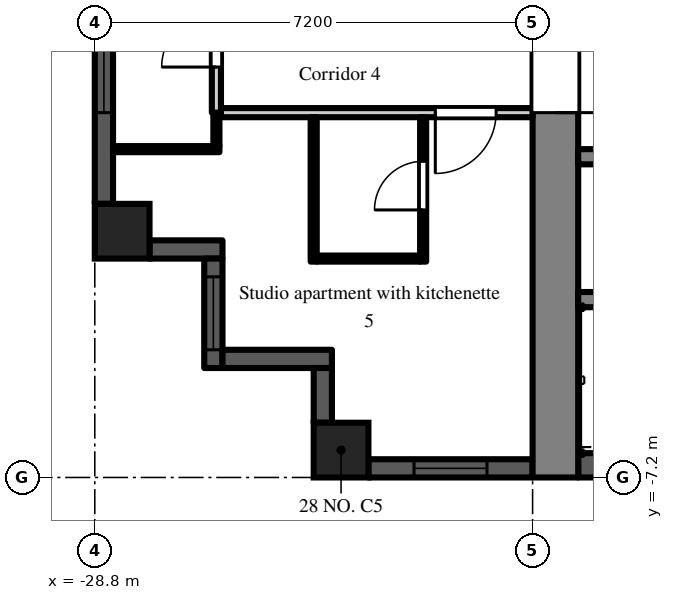
"""IFC4 building model, lengths in metres.
Left out: names, types, materials, properties, quantities, classifications, styles, units other than length and angle.
Written with IfcOpenShell. Run it as: python <this file> out.ifc"""

import sys

from ifc_helpers import new_model, si_unit, direction, frame, frame_2d, origin, origin_2d, place, context, subcontext, project, spatial, rectangle, extrude, element, fill, save


model = new_model("IFC4")
c1 = context("Model", 3, precision=1e-05, world=origin(), true_north=direction((0.0, 1.0)))
c2 = subcontext(c1, "Body", "Model", "MODEL_VIEW")
j1 = project(units=[si_unit("LENGTHUNIT", "METRE"), si_unit("PLANEANGLEUNIT", "RADIAN")], contexts=[c1])
p1 = place(None, origin())
s1 = spatial("IfcSite", under=j1, at=p1, CompositionType="ELEMENT")
p2 = place(p1, origin())
s2 = spatial("IfcBuilding", under=s1, at=p2, CompositionType="ELEMENT")
p3 = place(p2, frame((0.0, 0.0, 231.9)))
s3 = spatial("IfcBuildingStorey", under=s2, at=p3, CompositionType="ELEMENT", Elevation=231.9)
for number, where, z_axis, x_axis in (
    (1, (-28.35, -3.15, 0.0), (0.0, 0.0, 1.0), (1.0, 0.0, 0.0)),
    (2, (-24.75, -6.75, 0.0), (0.0, 0.0, 1.0), (1.0, 0.0, 0.0)),
):
    element("IfcColumn", number, at=place(p3, frame(where, z_axis=z_axis, x_axis=x_axis)), inside=s3, PredefinedType="COLUMN", context=c2, shape_type="SweptSolid", body=[
        extrude(rectangle(XDim=0.9, YDim=0.9, at=origin_2d()), origin(), (0.0, 0.0, 1.0), 3.0),
    ])
p4 = place(p3, frame((-28.65, 2.7, 0.0), z_axis=(0.0, 0.0, 1.0), x_axis=(0.0, -1.0, 0.0)))
e3 = element("IfcWall", 3, at=p4, inside=s3, PredefinedType="SOLIDWALL", context=c2, shape_type="SweptSolid", body=[
    extrude(rectangle(XDim=5.4, YDim=0.3, at=frame_2d((2.7, 0.0))), origin(), (0.0, 0.0, 1.0), 2.3),
])
p5 = place(p4, frame((1.5, 0.0, 0.2)))
e4 = element("IfcOpeningElement", 4, at=p5, cuts=e3, PredefinedType="OPENING", context=c2, shape_type="SweptSolid", body=[
    extrude(rectangle(XDim=2.4, YDim=1.85, at=frame_2d((1.2, 0.925))), frame((0.0, 0.16, 0.0), z_axis=(0.0, -1.0, 0.0), x_axis=(1.0, 0.0, 0.0)), (0.0, 0.0, 1.0), 0.32),
])
p6 = place(p3, frame((-27.9, -3.45, 0.0), z_axis=(0.0, 0.0, 1.0), x_axis=(1.0, 0.0, 0.0)))
e5 = element("IfcWall", 5, at=p6, inside=s3, PredefinedType="SOLIDWALL", context=c2, shape_type="SweptSolid", body=[
    extrude(rectangle(XDim=1.2, YDim=0.3, at=frame_2d((0.6, 0.0))), origin(), (0.0, 0.0, 1.0), 2.6),
])
p7 = place(p3, frame((-26.85, -3.6, 0.0), z_axis=(0.0, 0.0, 1.0), x_axis=(0.0, -1.0, 0.0)))
e6 = element("IfcWall", 6, at=p7, inside=s3, PredefinedType="SOLIDWALL", context=c2, shape_type="SweptSolid", body=[
    extrude(rectangle(XDim=1.8, YDim=0.3, at=frame_2d((0.9, 0.0))), origin(), (0.0, 0.0, 1.0), 2.6),
])
p8 = place(p7, frame((0.3, 0.0, 0.2)))
e7 = element("IfcOpeningElement", 7, at=p8, cuts=e6, PredefinedType="OPENING", context=c2, shape_type="SweptSolid", body=[
    extrude(rectangle(XDim=1.2, YDim=1.85, at=frame_2d((0.6, 0.925))), frame((0.0, 0.16, 0.0), z_axis=(0.0, -1.0, 0.0), x_axis=(1.0, 0.0, 0.0)), (0.0, 0.0, 1.0), 0.32),
])
p9 = place(p3, frame((-26.7, -5.25, 0.0), z_axis=(0.0, 0.0, 1.0), x_axis=(1.0, 0.0, 0.0)))
e8 = element("IfcWall", 8, at=p9, inside=s3, PredefinedType="SOLIDWALL", context=c2, shape_type="SweptSolid", body=[
    extrude(rectangle(XDim=1.8, YDim=0.3, at=frame_2d((0.9, 0.0))), origin(), (0.0, 0.0, 1.0), 2.6),
])
p10 = place(p3, frame((-25.05, -5.4, 0.0), z_axis=(0.0, 0.0, 1.0), x_axis=(0.0, -1.0, 0.0)))
e9 = element("IfcWall", 9, at=p10, inside=s3, PredefinedType="SOLIDWALL", context=c2, shape_type="SweptSolid", body=[
    extrude(rectangle(XDim=0.9, YDim=0.3, at=frame_2d((0.45, 0.0))), origin(), (0.0, 0.0, 1.0), 2.6),
])
p11 = place(p3, frame((-24.3, -7.05, 0.0), z_axis=(0.0, 0.0, 1.0), x_axis=(1.0, 0.0, 0.0)))
e10 = element("IfcWall", 10, at=p11, inside=s3, PredefinedType="SOLIDWALL", context=c2, shape_type="SweptSolid", body=[
    extrude(rectangle(XDim=2.7, YDim=0.3, at=frame_2d((1.35, 0.0))), origin(), (0.0, 0.0, 1.0), 2.3),
])
p12 = place(p11, frame((0.75, 0.0, 0.2)))
e11 = element("IfcOpeningElement", 11, at=p12, cuts=e10, PredefinedType="OPENING", context=c2, shape_type="SweptSolid", body=[
    extrude(rectangle(XDim=1.2, YDim=1.85, at=frame_2d((0.6, 0.925))), frame((0.0, 0.16, 0.0), z_axis=(0.0, -1.0, 0.0), x_axis=(1.0, 0.0, 0.0)), (0.0, 0.0, 1.0), 0.32),
])
p13 = place(p3, frame((-21.225, -7.2, 0.0), z_axis=(0.0, 0.0, 1.0), x_axis=(0.0, 1.0, 0.0)))
e12 = element("IfcWall", 12, at=p13, inside=s3, PredefinedType="SHEAR", context=c2, shape_type="SweptSolid", body=[
    extrude(rectangle(XDim=14.4, YDim=0.75, at=frame_2d((7.2, 0.0))), origin(), (0.0, 0.0, 1.0), 2.6),
])
p14 = place(p13, frame((6.0, 0.0, 0.0)))
e13 = element("IfcOpeningElement", 13, at=p14, cuts=e12, PredefinedType="OPENING", context=c2, shape_type="SweptSolid", body=[
    extrude(rectangle(XDim=2.4, YDim=2.2, at=frame_2d((1.2, 1.1))), frame((0.0, 0.385, 0.0), z_axis=(0.0, -1.0, 0.0), x_axis=(1.0, 0.0, 0.0)), (0.0, 0.0, 1.0), 0.77),
])
p15 = place(p3, frame((-7.9, -7.0, 0.0), z_axis=(0.0, 0.0, 1.0), x_axis=(-1.0, 0.0, 0.0)))
e14 = element("IfcWall", 14, at=p15, inside=s3, PredefinedType="SHEAR", context=c2, shape_type="SweptSolid", body=[
    extrude(rectangle(XDim=12.95, YDim=0.4, at=frame_2d((6.475, 0.0))), origin(), (0.0, 0.0, 1.0), 2.6),
])
p16 = place(p3, frame((-7.9, -1.925, 0.0), z_axis=(0.0, 0.0, 1.0), x_axis=(-1.0, 0.0, 0.0)))
e15 = element("IfcWall", 15, at=p16, inside=s3, PredefinedType="SHEAR", context=c2, shape_type="SweptSolid", body=[
    extrude(rectangle(XDim=12.95, YDim=0.25, at=frame_2d((6.475, 0.0))), origin(), (0.0, 0.0, 1.0), 2.6),
])
p17 = place(p16, frame((0.525, 0.0, 0.0)))
e16 = element("IfcOpeningElement", 16, at=p17, cuts=e15, PredefinedType="OPENING", context=c2, shape_type="SweptSolid", body=[
    extrude(rectangle(XDim=0.9, YDim=2.1, at=frame_2d((0.45, 1.05))), frame((0.0, 0.135, 0.0), z_axis=(0.0, -1.0, 0.0), x_axis=(1.0, 0.0, 0.0)), (0.0, 0.0, 1.0), 0.27),
])
p18 = place(p16, frame((2.625, 0.0, 0.0)))
e17 = element("IfcOpeningElement", 17, at=p18, cuts=e15, PredefinedType="OPENING", context=c2, shape_type="SweptSolid", body=[
    extrude(rectangle(XDim=1.1, YDim=2.1, at=frame_2d((0.55, 1.05))), frame((0.0, 0.135, 0.0), z_axis=(0.0, -1.0, 0.0), x_axis=(1.0, 0.0, 0.0)), (0.0, 0.0, 1.0), 0.27),
])
p19 = place(p16, frame((4.925, 0.0, 0.0)))
e18 = element("IfcOpeningElement", 18, at=p19, cuts=e15, PredefinedType="OPENING", context=c2, shape_type="SweptSolid", body=[
    extrude(rectangle(XDim=0.9, YDim=2.1, at=frame_2d((0.45, 1.05))), frame((0.0, 0.135, 0.0), z_axis=(0.0, -1.0, 0.0), x_axis=(1.0, 0.0, 0.0)), (0.0, 0.0, 1.0), 0.27),
])
p20 = place(p16, frame((8.225, 0.0, 0.0)))
e19 = element("IfcOpeningElement", 19, at=p20, cuts=e15, PredefinedType="OPENING", context=c2, shape_type="SweptSolid", body=[
    extrude(rectangle(XDim=0.9, YDim=2.1, at=frame_2d((0.45, 1.05))), frame((0.0, 0.135, 0.0), z_axis=(0.0, -1.0, 0.0), x_axis=(1.0, 0.0, 0.0)), (0.0, 0.0, 1.0), 0.27),
])
p21 = place(p16, frame((11.525, 0.0, 0.0)))
e20 = element("IfcOpeningElement", 20, at=p21, cuts=e15, PredefinedType="OPENING", context=c2, shape_type="SweptSolid", body=[
    extrude(rectangle(XDim=0.9, YDim=2.1, at=frame_2d((0.45, 1.05))), frame((0.0, 0.135, 0.0), z_axis=(0.0, -1.0, 0.0), x_axis=(1.0, 0.0, 0.0)), (0.0, 0.0, 1.0), 0.27),
])
p22 = place(p3, frame((-12.3, -4.275, 0.0), z_axis=(0.0, 0.0, 1.0), x_axis=(-1.0, 0.0, 0.0)))
e21 = element("IfcWall", 21, at=p22, inside=s3, PredefinedType="SHEAR", context=c2, shape_type="SweptSolid", body=[
    extrude(rectangle(XDim=8.55, YDim=0.25, at=frame_2d((4.275, 0.0))), origin(), (0.0, 0.0, 1.0), 2.6),
])
p23 = place(p3, frame((-28.5, -1.8, 0.0), z_axis=(0.0, 0.0, 1.0), x_axis=(1.0, 0.0, 0.0)))
e22 = element("IfcWall", 22, at=p23, inside=s3, PredefinedType="PARTITIONING", context=c2, shape_type="SweptSolid", body=[
    extrude(rectangle(XDim=1.75, YDim=0.1, at=frame_2d((0.875, 0.0))), origin(), (0.0, 0.0, 1.0), 2.6),
])
p24 = place(p3, frame((-26.8, -1.75, 0.0), z_axis=(0.0, 0.0, 1.0), x_axis=(0.0, 1.0, 0.0)))
e23 = element("IfcWall", 23, at=p24, inside=s3, PredefinedType="PARTITIONING", context=c2, shape_type="SweptSolid", body=[
    extrude(rectangle(XDim=0.55, YDim=0.1, at=frame_2d((0.275, 0.0))), origin(), (0.0, 0.0, 1.0), 2.6),
])
p25 = place(p3, frame((-26.8, -1.2, 0.0), z_axis=(0.0, 0.0, 1.0), x_axis=(0.0, 1.0, 0.0)))
e24 = element("IfcWall", 24, at=p25, inside=s3, PredefinedType="PARTITIONING", context=c2, shape_type="SweptSolid", body=[
    extrude(rectangle(XDim=2.4, YDim=0.15, at=frame_2d((1.2, 0.0))), origin(), (0.0, 0.0, 1.0), 2.6),
])
p26 = place(p25, frame((0.75, 0.0, 0.0)))
e25 = element("IfcOpeningElement", 25, at=p26, cuts=e24, PredefinedType="OPENING", context=c2, shape_type="SweptSolid", body=[
    extrude(rectangle(XDim=0.9, YDim=2.1, at=frame_2d((0.45, 1.05))), frame((0.0, 0.085, 0.0), z_axis=(0.0, -1.0, 0.0), x_axis=(1.0, 0.0, 0.0)), (0.0, 0.0, 1.0), 0.17),
])
p27 = place(p3, frame((-26.725, -1.2, 0.0), z_axis=(0.0, 0.0, 1.0), x_axis=(1.0, 0.0, 0.0)))
e26 = element("IfcWall", 26, at=p27, inside=s3, PredefinedType="PARTITIONING", context=c2, shape_type="SweptSolid", body=[
    extrude(rectangle(XDim=5.125, YDim=0.15, at=frame_2d((2.562, 0.0))), origin(), (0.0, 0.0, 1.0), 2.6),
])
p28 = place(p27, frame((3.525, 0.0, 0.0)))
e27 = element("IfcOpeningElement", 27, at=p28, cuts=e26, PredefinedType="OPENING", context=c2, shape_type="SweptSolid", body=[
    extrude(rectangle(XDim=1.0, YDim=2.1, at=frame_2d((0.5, 1.05))), frame((0.0, 0.085, 0.0), z_axis=(0.0, -1.0, 0.0), x_axis=(1.0, 0.0, 0.0)), (0.0, 0.0, 1.0), 0.17),
])
p29 = place(p3, frame((-25.2, -3.65, 0.0), z_axis=(0.0, 0.0, 1.0), x_axis=(0.0, 1.0, 0.0)))
e28 = element("IfcWall", 28, at=p29, inside=s3, PredefinedType="PARTITIONING", context=c2, shape_type="SweptSolid", body=[
    extrude(rectangle(XDim=2.375, YDim=0.1, at=frame_2d((1.188, 0.0))), origin(), (0.0, 0.0, 1.0), 2.6),
])
p30 = place(p3, frame((-25.15, -3.6, 0.0), z_axis=(0.0, 0.0, 1.0), x_axis=(1.0, 0.0, 0.0)))
e29 = element("IfcWall", 29, at=p30, inside=s3, PredefinedType="PARTITIONING", context=c2, shape_type="SweptSolid", body=[
    extrude(rectangle(XDim=1.7, YDim=0.1, at=frame_2d((0.85, 0.0))), origin(), (0.0, 0.0, 1.0), 2.6),
])
p31 = place(p3, frame((-23.4, -3.65, 0.0), z_axis=(0.0, 0.0, 1.0), x_axis=(0.0, 1.0, 0.0)))
e30 = element("IfcWall", 30, at=p31, inside=s3, PredefinedType="PARTITIONING", context=c2, shape_type="SweptSolid", body=[
    extrude(rectangle(XDim=2.375, YDim=0.1, at=frame_2d((1.188, 0.0))), origin(), (0.0, 0.0, 1.0), 2.6),
])
p32 = place(p31, frame((0.85, 0.0, 0.0)))
e31 = element("IfcOpeningElement", 31, at=p32, cuts=e30, PredefinedType="OPENING", context=c2, shape_type="SweptSolid", body=[
    extrude(rectangle(XDim=0.8, YDim=2.1, at=frame_2d((0.4, 1.05))), frame((0.0, 0.06, 0.0), z_axis=(0.0, -1.0, 0.0), x_axis=(1.0, 0.0, 0.0)), (0.0, 0.0, 1.0), 0.12),
])
p33 = place(p5, origin())
e32 = element("IfcWindow", 32, at=p33, inside=s3, PartitioningType="SINGLE_PANEL", PredefinedType="WINDOW", context=c2, shape_type="SweptSolid", body=[
    extrude(rectangle(XDim=2.4, YDim=1.85, at=frame_2d((1.2, 0.925))), frame((0.0, 0.03, 0.0), z_axis=(0.0, -1.0, 0.0), x_axis=(1.0, 0.0, 0.0)), (0.0, 0.0, 1.0), 0.06),
])
fill(e4, e32)
p34 = place(p8, origin())
e33 = element("IfcWindow", 33, at=p34, inside=s3, PartitioningType="SINGLE_PANEL", PredefinedType="WINDOW", context=c2, shape_type="SweptSolid", body=[
    extrude(rectangle(XDim=1.2, YDim=1.85, at=frame_2d((0.6, 0.925))), frame((0.0, 0.03, 0.0), z_axis=(0.0, -1.0, 0.0), x_axis=(1.0, 0.0, 0.0)), (0.0, 0.0, 1.0), 0.06),
])
fill(e7, e33)
p35 = place(p12, origin())
e34 = element("IfcWindow", 34, at=p35, inside=s3, PartitioningType="SINGLE_PANEL", PredefinedType="WINDOW", context=c2, shape_type="SweptSolid", body=[
    extrude(rectangle(XDim=1.2, YDim=1.85, at=frame_2d((0.6, 0.925))), frame((0.0, 0.03, 0.0), z_axis=(0.0, -1.0, 0.0), x_axis=(1.0, 0.0, 0.0)), (0.0, 0.0, 1.0), 0.06),
])
fill(e11, e34)
p36 = place(p14, frame((2.4, 0.0, 0.0), z_axis=(0.0, 0.0, 1.0), x_axis=(-1.0, 0.0, 0.0)))
e35 = element("IfcDoor", 35, at=p36, inside=s3, OperationType="DOUBLE_DOOR_DOUBLE_SWING", PredefinedType="DOOR", context=c2, shape_type="SweptSolid", body=[
    extrude(rectangle(XDim=2.4, YDim=2.2, at=frame_2d((1.2, 1.1))), frame((0.0, 0.025, 0.0), z_axis=(0.0, -1.0, 0.0), x_axis=(1.0, 0.0, 0.0)), (0.0, 0.0, 1.0), 0.05),
])
fill(e13, e35)
p37 = place(p26, origin())
e36 = element("IfcDoor", 36, at=p37, inside=s3, OperationType="SINGLE_SWING_LEFT", PredefinedType="DOOR", context=c2, shape_type="SweptSolid", body=[
    extrude(rectangle(XDim=0.9, YDim=2.1, at=frame_2d((0.45, 1.05))), frame((0.0, 0.025, 0.0), z_axis=(0.0, -1.0, 0.0), x_axis=(1.0, 0.0, 0.0)), (0.0, 0.0, 1.0), 0.05),
])
fill(e25, e36)
p38 = place(p32, origin())
e37 = element("IfcDoor", 37, at=p38, inside=s3, OperationType="SINGLE_SWING_LEFT", PredefinedType="DOOR", context=c2, shape_type="SweptSolid", body=[
    extrude(rectangle(XDim=0.8, YDim=2.1, at=frame_2d((0.4, 1.05))), frame((0.0, 0.025, 0.0), z_axis=(0.0, -1.0, 0.0), x_axis=(1.0, 0.0, 0.0)), (0.0, 0.0, 1.0), 0.05),
])
fill(e31, e37)
p39 = place(p28, frame((1.0, 0.0, 0.0), z_axis=(0.0, 0.0, 1.0), x_axis=(-1.0, 0.0, 0.0)))
e38 = element("IfcDoor", 38, at=p39, inside=s3, OperationType="SINGLE_SWING_RIGHT", PredefinedType="DOOR", context=c2, shape_type="SweptSolid", body=[
    extrude(rectangle(XDim=1.0, YDim=2.1, at=frame_2d((0.5, 1.05))), frame((0.0, 0.025, 0.0), z_axis=(0.0, -1.0, 0.0), x_axis=(1.0, 0.0, 0.0)), (0.0, 0.0, 1.0), 0.05),
])
fill(e27, e38)
save(model, sys.argv[1])
